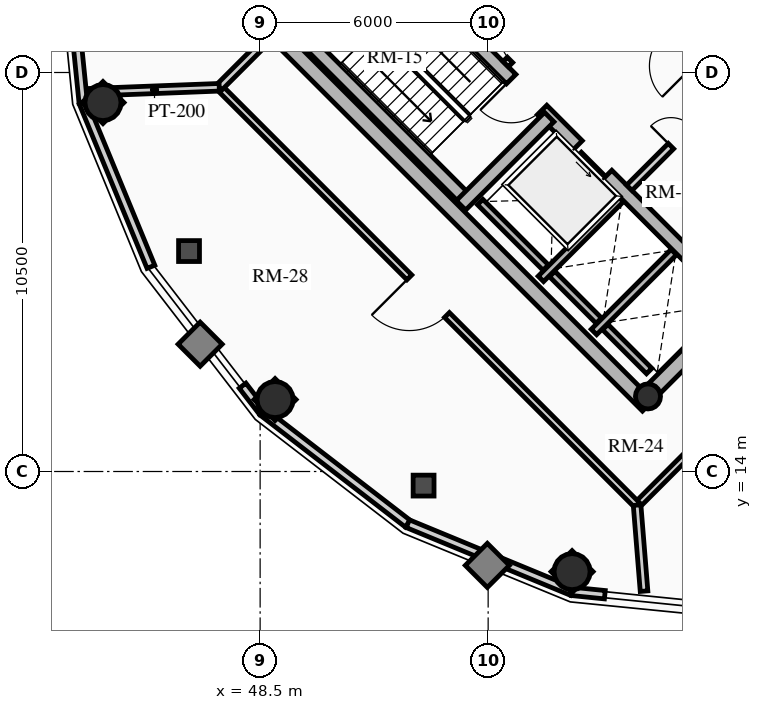
"""IFC4 building model, lengths in metres.
Left out: names, types, materials, properties, quantities, classifications, styles, units other than length and angle.
Written with IfcOpenShell. Run it as: python <this file> out.ifc"""

import sys

from ifc_helpers import new_model, si_unit, direction, frame, frame_2d, origin, origin_2d, place, context, subcontext, project, spatial, rectangle, circle, hollow_circle, extrude, source, transform, mapped, element, fill, save


model = new_model("IFC4")
c1 = context("Model", 3, precision=1e-05, world=origin(), true_north=direction((0.0, 1.0)))
c2 = subcontext(c1, "Body", "Model", "MODEL_VIEW")
j1 = project(units=[si_unit("LENGTHUNIT", "METRE"), si_unit("PLANEANGLEUNIT", "RADIAN")], contexts=[c1])
p1 = place(None, origin())
s1 = spatial("IfcSite", under=j1, at=p1, CompositionType="ELEMENT")
p2 = place(p1, origin())
s2 = spatial("IfcBuilding", under=s1, at=p2, CompositionType="ELEMENT")
p3 = place(p2, frame((0.0, 0.0, 235.65)))
s3 = spatial("IfcBuildingStorey", under=s2, at=p3, CompositionType="ELEMENT", Elevation=235.65)
for number, where, z_axis, x_axis in (
    (1, (58.702, 15.732, 0.0), (0.0, 0.0, 1.0), (-0.707, 0.707, 0.0)),
    (2, (66.268, 23.298, 0.0), (0.0, 0.0, 1.0), (-0.707, 0.707, 0.0)),
):
    element("IfcWall", number, at=place(p3, frame(where, z_axis=z_axis, x_axis=x_axis)), inside=s3, PredefinedType="SHEAR", context=c2, shape_type="SweptSolid", body=[
        extrude(rectangle(XDim=14.1, YDim=0.4, at=frame_2d((7.05, 0.0))), origin(), (0.0, 0.0, 1.0), 4.68),
    ])
p4 = place(p3, frame((58.561, 15.873, 0.0), z_axis=(0.0, 0.0, 1.0), x_axis=(0.707106781187, 0.707106781187, 0.0)))
e3 = element("IfcWall", 3, at=p4, inside=s3, PredefinedType="SHEAR", context=c2, shape_type="SweptSolid", body=[
    extrude(rectangle(XDim=10.7, YDim=0.4, at=frame_2d((5.35, 0.0))), origin(), (0.0, 0.0, 1.0), 4.68),
])
m1 = source(origin(), c2, "Body", "SweptSolid", [
    extrude(rectangle(XDim=1.5, YDim=2.02, at=frame_2d((0.75, 1.01))), frame((0.0, 0.21, 0.0), z_axis=(0.0, -1.0, 0.0), x_axis=(1.0, 0.0, 0.0)), (0.0, 0.0, 1.0), 0.42),
])
p5 = place(p4, frame((5.45, 0.0, 0.0)))
e4 = element("IfcOpeningElement", 4, at=p5, cuts=e3, PredefinedType="OPENING", context=c2, shape_type="MappedRepresentation", body=[
    mapped(m1, transform((0.0, 0.0, 0.0), x_axis=(1.0, 0.0, 0.0), y_axis=(0.0, 1.0, 0.0), z_axis=(0.0, 0.0, 1.0), scale=1.0)),
])
p6 = place(p3, frame((61.06, 18.373, 0.0), z_axis=(0.0, 0.0, 1.0), x_axis=(-0.707106781187, 0.707106781187, 0.0)))
e5 = element("IfcWall", 5, at=p6, inside=s3, PredefinedType="SHEAR", context=c2, shape_type="SweptSolid", body=[
    extrude(rectangle(XDim=13.7, YDim=0.35, at=frame_2d((6.85, 0.0))), origin(), (0.0, 0.0, 1.0), 4.68),
])
m2 = source(origin(), c2, "Body", "SweptSolid", [
    extrude(rectangle(XDim=1.1, YDim=2.015, at=frame_2d((0.55, 1.007))), frame((0.0, 0.185, 0.0), z_axis=(0.0, -1.0, 0.0), x_axis=(1.0, 0.0, 0.0)), (0.0, 0.0, 1.0), 0.37),
])
p7 = place(p6, frame((4.85, 0.0, 0.0)))
e6 = element("IfcOpeningElement", 6, at=p7, cuts=e5, PredefinedType="OPENING", context=c2, shape_type="MappedRepresentation", body=[
    mapped(m2, transform((0.0, 0.0, 0.0), x_axis=(1.0, 0.0, 0.0), y_axis=(0.0, 1.0, 0.0), z_axis=(0.0, 0.0, 1.0), scale=1.0)),
])
m3 = source(origin(), c2, "Body", "SweptSolid", [
    extrude(rectangle(XDim=1.15, YDim=2.02, at=frame_2d((0.575, 1.01))), frame((0.0, 0.185, 0.0), z_axis=(0.0, -1.0, 0.0), x_axis=(1.0, 0.0, 0.0)), (0.0, 0.0, 1.0), 0.37),
])
p8 = place(p6, frame((7.27, 0.0, 0.0)))
e7 = element("IfcOpeningElement", 7, at=p8, cuts=e5, PredefinedType="OPENING", context=c2, shape_type="MappedRepresentation", body=[
    mapped(m3, transform((0.0, 0.0, 0.0), x_axis=(1.0, 0.0, 0.0), y_axis=(0.0, 1.0, 0.0), z_axis=(0.0, 0.0, 1.0), scale=1.0)),
])
p9 = place(p3, frame((63.627, 20.94, 0.0), z_axis=(0.0, 0.0, 1.0), x_axis=(-0.707119496762, 0.707094065383, 0.0)))
e8 = element("IfcWall", 8, at=p9, inside=s3, PredefinedType="SHEAR", context=c2, shape_type="SweptSolid", body=[
    extrude(rectangle(XDim=9.6, YDim=0.35, at=frame_2d((4.8, 0.0))), origin(), (0.0, 0.0, 1.0), 4.68),
])
p10 = place(p9, frame((5.28, 0.0, 0.0)))
e9 = element("IfcOpeningElement", 9, at=p10, cuts=e8, PredefinedType="OPENING", context=c2, shape_type="MappedRepresentation", body=[
    mapped(m3, transform((0.0, 0.0, 0.0), x_axis=(1.0, 0.0, 0.0), y_axis=(0.0, 1.0, 0.0), z_axis=(0.0, 0.0, 1.0), scale=1.0)),
])
p11 = place(p3, frame((53.922, 21.141, 0.0), z_axis=(0.0, 0.0, 1.0), x_axis=(-0.707106781187, 0.707106781187, 0.0)))
e10 = element("IfcWall", 10, at=p11, inside=s3, PredefinedType="SHEAR", context=c2, shape_type="SweptSolid", body=[
    extrude(rectangle(XDim=6.695, YDim=0.35, at=frame_2d((3.348, 0.0))), origin(), (0.0, 0.0, 1.0), 4.68),
])
p12 = place(p3, frame((53.784, 21.003, 0.0), z_axis=(0.0, 0.0, 1.0), x_axis=(0.707106781187, 0.707106781187, 0.0)))
e11 = element("IfcWall", 11, at=p12, inside=s3, PredefinedType="SHEAR", context=c2, shape_type="SweptSolid", body=[
    extrude(rectangle(XDim=3.285, YDim=0.35, at=frame_2d((1.643, 0.0))), origin(), (0.0, 0.0, 1.0), 4.68),
])
p13 = place(p3, frame((58.706, 15.976, 0.0), z_axis=(0.0, 0.0, 1.0), x_axis=(0.707106781187, 0.707106781187, 0.0)))
e12 = element("IfcColumn", 12, at=p13, inside=s3, PredefinedType="COLUMN", context=c2, shape_type="SweptSolid", body=[
    extrude(hollow_circle(Radius=0.33, WallThickness=0.025, at=origin_2d()), origin(), (0.0, 0.0, 1.0), 4.68),
])
for number, where, z_axis, x_axis in (
    (13, (44.365, 23.709, 0.0), (0.0, 0.0, 1.0), (1.0, 0.0, 0.0)),
    (14, (48.893, 15.893, 0.0), (0.0, 0.0, 1.0), (1.0, 0.0, 0.0)),
    (15, (56.709, 11.365, 0.0), (0.0, 0.0, 1.0), (1.0, 0.0, 0.0)),
):
    element("IfcColumn", number, at=place(p3, frame(where, z_axis=z_axis, x_axis=x_axis)), inside=s3, PredefinedType="COLUMN", context=c2, shape_type="SweptSolid", body=[
        extrude(circle(Radius=0.475, at=origin_2d()), origin(), (0.0, 0.0, 1.0), 4.68),
    ])
p14 = place(p3, frame((43.845, 23.705, 0.0), z_axis=(0.0, 0.0, 1.0), x_axis=(-0.100570534541, 0.994929930991, 0.0)))
e16 = element("IfcWall", 16, at=p14, inside=s3, PredefinedType="SOLIDWALL", context=c2, shape_type="SweptSolid", body=[
    extrude(rectangle(XDim=4.418, YDim=0.22, at=frame_2d((2.209, 0.0))), origin(), (0.0, 0.0, 1.0), 3.696),
])
p15 = place(p3, frame((45.626, 19.387, 0.0), z_axis=(0.0, 0.0, 1.0), x_axis=(-0.381309704956, 0.924447353237, 0.0)))
e17 = element("IfcWall", 17, at=p15, inside=s3, PredefinedType="SOLIDWALL", context=c2, shape_type="SweptSolid", body=[
    extrude(rectangle(XDim=4.671, YDim=0.22, at=frame_2d((2.335, 0.0))), origin(), (0.0, 0.0, 1.0), 3.696),
])
p16 = place(p3, frame((48.569, 15.569, 0.0), z_axis=(0.0, 0.0, 1.0), x_axis=(-0.610320822734, 0.792154336817, 0.0)))
e18 = element("IfcWall", 18, at=p16, inside=s3, PredefinedType="SOLIDWALL", context=c2, shape_type="SweptSolid", body=[
    extrude(rectangle(XDim=0.87, YDim=0.22, at=frame_2d((0.435, 0.0))), origin(), (0.0, 0.0, 1.0), 3.696),
])
p17 = place(p3, frame((52.387, 12.626, 0.0), z_axis=(0.0, 0.0, 1.0), x_axis=(-0.791998462147, 0.610523083886, 0.0)))
e19 = element("IfcWall", 19, at=p17, inside=s3, PredefinedType="SOLIDWALL", context=c2, shape_type="SweptSolid", body=[
    extrude(rectangle(XDim=4.82, YDim=0.22, at=frame_2d((2.41, 0.0))), origin(), (0.0, 0.0, 1.0), 3.696),
])
p18 = place(p3, frame((56.705, 10.845, 0.0), z_axis=(0.0, 0.0, 1.0), x_axis=(-0.924447353237, 0.381309704956, 0.0)))
e20 = element("IfcWall", 20, at=p18, inside=s3, PredefinedType="SOLIDWALL", context=c2, shape_type="SweptSolid", body=[
    extrude(rectangle(XDim=4.671, YDim=0.22, at=frame_2d((2.335, 0.0))), origin(), (0.0, 0.0, 1.0), 3.696),
])
p19 = place(p3, frame((57.57, 10.758, 0.0), z_axis=(0.0, 0.0, 1.0), x_axis=(-0.994914209363, 0.100725945054, 0.0)))
e21 = element("IfcWall", 21, at=p19, inside=s3, PredefinedType="SOLIDWALL", context=c2, shape_type="SweptSolid", body=[
    extrude(rectangle(XDim=0.87, YDim=0.22, at=frame_2d((0.435, 0.0))), origin(), (0.0, 0.0, 1.0), 3.696),
])
p20 = place(p3, frame((55.888, 19.069, 0.0), z_axis=(0.0, 0.0, 1.0), x_axis=(0.707106781187, 0.707106781187, 0.0)))
e22 = element("IfcWall", 22, at=p20, inside=s3, PredefinedType="SHEAR", context=c2, shape_type="SweptSolid", body=[
    extrude(rectangle(XDim=2.97, YDim=0.2, at=frame_2d((1.485, 0.0))), origin(), (0.0, 0.0, 1.0), 4.68),
])
p21 = place(p3, frame((56.015, 19.366, 0.0), z_axis=(0.0, 0.0, 1.0), x_axis=(-0.707106781187, 0.707106781187, 0.0)))
e23 = element("IfcWall", 23, at=p21, inside=s3, PredefinedType="SHEAR", context=c2, shape_type="SweptSolid", body=[
    extrude(rectangle(XDim=2.44, YDim=0.2, at=frame_2d((1.22, 0.0))), origin(), (0.0, 0.0, 1.0), 4.68),
])
p22 = place(p3, frame((57.284, 17.673, 0.0), z_axis=(0.0, 0.0, 1.0), x_axis=(0.707147878904, 0.70706568108, 0.0)))
e24 = element("IfcWall", 24, at=p22, inside=s3, PredefinedType="SHEAR", context=c2, shape_type="SweptSolid", body=[
    extrude(rectangle(XDim=2.97, YDim=0.2, at=frame_2d((1.485, 0.0))), origin(), (0.0, 0.0, 1.0), 4.68),
])
p23 = place(p3, frame((57.412, 17.97, 0.0), z_axis=(0.0, 0.0, 1.0), x_axis=(-0.707106781187, 0.707106781187, 0.0)))
e25 = element("IfcWall", 25, at=p23, inside=s3, PredefinedType="SHEAR", context=c2, shape_type="SweptSolid", body=[
    extrude(rectangle(XDim=1.735, YDim=0.2, at=frame_2d((0.867, 0.0))), origin(), (0.0, 0.0, 1.0), 4.68),
])
p24 = place(p3, frame((58.737, 16.644, 0.0), z_axis=(0.0, 0.0, 1.0), x_axis=(-0.707032117043, 0.707181437447, 0.0)))
e26 = element("IfcWall", 26, at=p24, inside=s3, PredefinedType="SHEAR", context=c2, shape_type="SweptSolid", body=[
    extrude(rectangle(XDim=1.635, YDim=0.2, at=frame_2d((0.817, 0.0))), origin(), (0.0, 0.0, 1.0), 4.68),
])
p25 = place(p3, frame((58.214, 21.467, 0.0), z_axis=(0.0, 0.0, 1.0), x_axis=(0.707106781187, 0.707106781187, 0.0)))
e27 = element("IfcWall", 27, at=p25, inside=s3, PredefinedType="PARTITIONING", context=c2, shape_type="SweptSolid", body=[
    extrude(rectangle(XDim=3.28, YDim=0.2, at=frame_2d((1.64, 0.0))), origin(), (0.0, 0.0, 1.0), 4.325),
])
m4 = source(origin(), c2, "Body", "SweptSolid", [
    extrude(rectangle(XDim=1.5, YDim=2.02, at=frame_2d((0.75, 1.01))), frame((0.0, 0.11, 0.0), z_axis=(0.0, -1.0, 0.0), x_axis=(1.0, 0.0, 0.0)), (0.0, 0.0, 1.0), 0.22),
])
p26 = place(p25, frame((1.55, 0.0, 0.0)))
e28 = element("IfcOpeningElement", 28, at=p26, cuts=e27, PredefinedType="OPENING", context=c2, shape_type="MappedRepresentation", body=[
    mapped(m4, transform((0.0, 0.0, 0.0), x_axis=(1.0, 0.0, 0.0), y_axis=(0.0, 1.0, 0.0), z_axis=(0.0, 0.0, 1.0), scale=1.0)),
])
p27 = place(p3, frame((54.961, 24.719, 0.0), z_axis=(0.0, 0.0, 1.0), x_axis=(0.707106781187, 0.707106781187, 0.0)))
e29 = element("IfcWall", 29, at=p27, inside=s3, PredefinedType="PARTITIONING", context=c2, shape_type="SweptSolid", body=[
    extrude(rectangle(XDim=3.28, YDim=0.2, at=frame_2d((1.64, 0.0))), origin(), (0.0, 0.0, 1.0), 4.325),
])
m5 = source(origin(), c2, "Body", "SweptSolid", [
    extrude(rectangle(XDim=0.9, YDim=2.005, at=frame_2d((0.45, 1.002))), frame((0.0, 0.11, 0.0), z_axis=(0.0, -1.0, 0.0), x_axis=(1.0, 0.0, 0.0)), (0.0, 0.0, 1.0), 0.22),
])
p28 = place(p27, frame((0.16, 0.0, 0.0)))
e30 = element("IfcOpeningElement", 30, at=p28, cuts=e29, PredefinedType="OPENING", context=c2, shape_type="MappedRepresentation", body=[
    mapped(m5, transform((0.0, 0.0, 0.0), x_axis=(1.0, 0.0, 0.0), y_axis=(0.0, 1.0, 0.0), z_axis=(0.0, 0.0, 1.0), scale=1.0)),
])
p29 = place(p3, frame((58.419, 13.115, 0.0), z_axis=(0.0, 0.0, 1.0), x_axis=(0.707106781187, 0.707106781187, 0.0)))
e31 = element("IfcWall", 31, at=p29, inside=s3, PredefinedType="PARTITIONING", context=c2, shape_type="SweptSolid", body=[
    extrude(rectangle(XDim=14.8, YDim=0.18, at=frame_2d((7.4, 0.0))), origin(), (0.0, 0.0, 1.0), 3.616),
])
m6 = source(origin(), c2, "Body", "SweptSolid", [
    extrude(rectangle(XDim=1.4, YDim=2.02, at=frame_2d((0.7, 1.01))), frame((0.0, 0.1, 0.0), z_axis=(0.0, -1.0, 0.0), x_axis=(1.0, 0.0, 0.0)), (0.0, 0.0, 1.0), 0.2),
])
p30 = place(p29, frame((6.7, 0.0, 0.0)))
e32 = element("IfcOpeningElement", 32, at=p30, cuts=e31, PredefinedType="OPENING", context=c2, shape_type="MappedRepresentation", body=[
    mapped(m6, transform((0.0, 0.0, 0.0), x_axis=(1.0, 0.0, 0.0), y_axis=(0.0, 1.0, 0.0), z_axis=(0.0, 0.0, 1.0), scale=1.0)),
])
p31 = place(p3, frame((58.419, 13.115, 0.0), z_axis=(0.0, 0.0, 1.0), x_axis=(-0.707106781187, 0.707106781187, 0.0)))
e33 = element("IfcWall", 33, at=p31, inside=s3, PredefinedType="PARTITIONING", context=c2, shape_type="SweptSolid", body=[
    extrude(rectangle(XDim=15.55, YDim=0.18, at=frame_2d((7.775, 0.0))), origin(), (0.0, 0.0, 1.0), 3.616),
])
p32 = place(p31, frame((7.075, 0.0, 0.0)))
e34 = element("IfcOpeningElement", 34, at=p32, cuts=e33, PredefinedType="OPENING", context=c2, shape_type="MappedRepresentation", body=[
    mapped(m6, transform((0.0, 0.0, 0.0), x_axis=(1.0, 0.0, 0.0), y_axis=(0.0, 1.0, 0.0), z_axis=(0.0, 0.0, 1.0), scale=1.0)),
])
p33 = place(p3, frame((68.885, 23.581, 0.0), z_axis=(0.0, 0.0, 1.0), x_axis=(-0.707106781187, 0.707106781187, 0.0)))
e35 = element("IfcWall", 35, at=p33, inside=s3, PredefinedType="PARTITIONING", context=c2, shape_type="SweptSolid", body=[
    extrude(rectangle(XDim=15.55, YDim=0.18, at=frame_2d((7.775, 0.0))), origin(), (0.0, 0.0, 1.0), 2.892),
])
p34 = place(p33, frame((7.075, 0.0, 0.0)))
e36 = element("IfcOpeningElement", 36, at=p34, cuts=e35, PredefinedType="OPENING", context=c2, shape_type="MappedRepresentation", body=[
    mapped(m6, transform((0.0, 0.0, 0.0), x_axis=(1.0, 0.0, 0.0), y_axis=(0.0, 1.0, 0.0), z_axis=(0.0, 0.0, 1.0), scale=1.0)),
])
p35 = place(p3, frame((47.424, 24.111, 0.0), z_axis=(0.0, 0.0, 1.0), x_axis=(0.707172758026, 0.707040798191, 0.0)))
e37 = element("IfcWall", 37, at=p35, inside=s3, PredefinedType="PARTITIONING", context=c2, shape_type="SweptSolid", body=[
    extrude(rectangle(XDim=1.85, YDim=0.2, at=frame_2d((0.925, 0.0))), origin(), (0.0, 0.0, 1.0), 3.616),
])
p36 = place(p3, frame((47.424, 24.111, 0.0), z_axis=(0.0, 0.0, 1.0), x_axis=(-0.999254494259, -0.038606420501, 0.0)))
e38 = element("IfcWall", 38, at=p36, inside=s3, PredefinedType="PARTITIONING", context=c2, shape_type="SweptSolid", body=[
    extrude(rectangle(XDim=3.408, YDim=0.2, at=frame_2d((1.704, 0.0))), origin(), (0.0, 0.0, 1.0), 3.616),
])
p37 = place(p3, frame((58.419, 13.115, 0.0), z_axis=(0.0, 0.0, 1.0), x_axis=(0.080501307187, -0.996754503146, 0.0)))
e39 = element("IfcWall", 39, at=p37, inside=s3, PredefinedType="PARTITIONING", context=c2, shape_type="SweptSolid", body=[
    extrude(rectangle(XDim=2.271, YDim=0.2, at=frame_2d((1.136, 0.0))), origin(), (0.0, 0.0, 1.0), 3.696),
])
m7 = source(origin(), c2, "Body", "SweptSolid", [
    extrude(rectangle(XDim=1.1, YDim=2.015, at=frame_2d((0.55, 1.007))), frame((0.0, 0.025, 0.0), z_axis=(0.0, -1.0, 0.0), x_axis=(1.0, 0.0, 0.0)), (0.0, 0.0, 1.0), 0.05),
])
p38 = place(p7, origin())
e40 = element("IfcDoor", 40, at=p38, inside=s3, OperationType="SLIDING_TO_LEFT", PredefinedType="DOOR", context=c2, shape_type="MappedRepresentation", body=[
    mapped(m7, transform((0.0, 0.0, 0.0), x_axis=(1.0, 0.0, 0.0), y_axis=(0.0, 1.0, 0.0), z_axis=(0.0, 0.0, 1.0), scale=1.0)),
])
fill(e6, e40)
m8 = source(origin(), c2, "Body", "SweptSolid", [
    extrude(rectangle(XDim=1.15, YDim=2.02, at=frame_2d((0.575, 1.01))), frame((0.0, 0.025, 0.0), z_axis=(0.0, -1.0, 0.0), x_axis=(1.0, 0.0, 0.0)), (0.0, 0.0, 1.0), 0.05),
])
p39 = place(p8, origin())
e41 = element("IfcDoor", 41, at=p39, inside=s3, OperationType="SINGLE_SWING_RIGHT", PredefinedType="DOOR", context=c2, shape_type="MappedRepresentation", body=[
    mapped(m8, transform((0.0, 0.0, 0.0), x_axis=(1.0, 0.0, 0.0), y_axis=(0.0, 1.0, 0.0), z_axis=(0.0, 0.0, 1.0), scale=1.0)),
])
fill(e7, e41)
p40 = place(p10, origin())
e42 = element("IfcDoor", 42, at=p40, inside=s3, OperationType="SINGLE_SWING_LEFT", PredefinedType="DOOR", context=c2, shape_type="MappedRepresentation", body=[
    mapped(m8, transform((0.0, 0.0, 0.0), x_axis=(1.0, 0.0, 0.0), y_axis=(0.0, 1.0, 0.0), z_axis=(0.0, 0.0, 1.0), scale=1.0)),
])
fill(e9, e42)
m9 = source(origin(), c2, "Body", "SweptSolid", [
    extrude(rectangle(XDim=1.5, YDim=2.02, at=frame_2d((0.75, 1.01))), frame((0.0, 0.025, 0.0), z_axis=(0.0, -1.0, 0.0), x_axis=(1.0, 0.0, 0.0)), (0.0, 0.0, 1.0), 0.05),
])
p41 = place(p26, origin())
e43 = element("IfcDoor", 43, at=p41, inside=s3, OperationType="DOUBLE_DOOR_SINGLE_SWING", PredefinedType="DOOR", context=c2, shape_type="MappedRepresentation", body=[
    mapped(m9, transform((0.0, 0.0, 0.0), x_axis=(1.0, 0.0, 0.0), y_axis=(0.0, 1.0, 0.0), z_axis=(0.0, 0.0, 1.0), scale=1.0)),
])
fill(e28, e43)
m10 = source(origin(), c2, "Body", "SweptSolid", [
    extrude(rectangle(XDim=0.9, YDim=2.005, at=frame_2d((0.45, 1.002))), frame((0.0, 0.025, 0.0), z_axis=(0.0, -1.0, 0.0), x_axis=(1.0, 0.0, 0.0)), (0.0, 0.0, 1.0), 0.05),
])
p42 = place(p28, origin())
e44 = element("IfcDoor", 44, at=p42, inside=s3, OperationType="SINGLE_SWING_RIGHT", PredefinedType="DOOR", context=c2, shape_type="MappedRepresentation", body=[
    mapped(m10, transform((0.0, 0.0, 0.0), x_axis=(1.0, 0.0, 0.0), y_axis=(0.0, 1.0, 0.0), z_axis=(0.0, 0.0, 1.0), scale=1.0)),
])
fill(e30, e44)
m11 = source(origin(), c2, "Body", "SweptSolid", [
    extrude(rectangle(XDim=1.4, YDim=2.02, at=frame_2d((0.7, 1.01))), frame((0.0, 0.025, 0.0), z_axis=(0.0, -1.0, 0.0), x_axis=(1.0, 0.0, 0.0)), (0.0, 0.0, 1.0), 0.05),
])
p43 = place(p32, origin())
e45 = element("IfcDoor", 45, at=p43, inside=s3, OperationType="SINGLE_SWING_RIGHT", PredefinedType="DOOR", context=c2, shape_type="MappedRepresentation", body=[
    mapped(m11, transform((0.0, 0.0, 0.0), x_axis=(1.0, 0.0, 0.0), y_axis=(0.0, 1.0, 0.0), z_axis=(0.0, 0.0, 1.0), scale=1.0)),
])
fill(e34, e45)
save(model, sys.argv[1])
